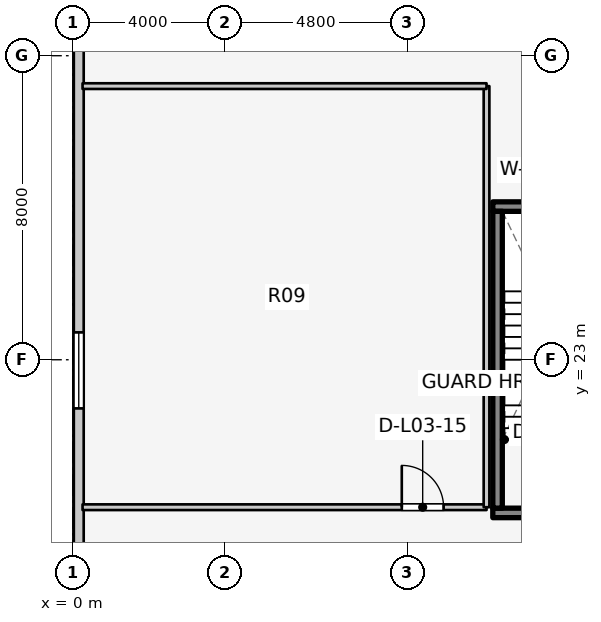
"""IFC4 building model, lengths in metres.
Left out: names, types, materials, properties, quantities, classifications, styles, units other than length and angle.
Written with IfcOpenShell. Run it as: python <this file> out.ifc"""

import sys

from ifc_helpers import new_model, si_unit, direction, frame, frame_2d, origin, place, context, subcontext, project, spatial, rectangle, extrude, element, fill, save


model = new_model("IFC4")
c1 = context("Model", 3, precision=1e-05, world=origin(), true_north=direction((0.0, 1.0)))
c2 = subcontext(c1, "Body", "Model", "MODEL_VIEW")
j1 = project(units=[si_unit("LENGTHUNIT", "METRE"), si_unit("PLANEANGLEUNIT", "RADIAN")], contexts=[c1])
p1 = place(None, origin())
s1 = spatial("IfcSite", under=j1, at=p1, CompositionType="ELEMENT")
p2 = place(p1, origin())
s2 = spatial("IfcBuilding", under=s1, at=p2, CompositionType="ELEMENT")
p3 = place(p2, frame((0.0, 0.0, 9.2)))
s3 = spatial("IfcBuildingStorey", under=s2, at=p3, CompositionType="ELEMENT", Elevation=9.2)
p4 = place(p3, frame((11.045, 18.97, 0.0), z_axis=(0.0, 0.0, 1.0), x_axis=(1.0, 0.0, 0.0)))
e1 = element("IfcWall", 1, at=p4, inside=s3, PredefinedType="SOLIDWALL", context=c2, shape_type="SweptSolid", body=[
    extrude(rectangle(XDim=3.782, YDim=0.25, at=frame_2d((1.891, 0.0))), origin(), (0.0, 0.0, 1.0), 4.6),
])
p5 = place(p4, frame((1.135, 0.0, 0.0)))
e2 = element("IfcOpeningElement", 2, at=p5, cuts=e1, PredefinedType="OPENING", context=c2, shape_type="SweptSolid", body=[
    extrude(rectangle(XDim=1.1, YDim=2.1, at=frame_2d((0.55, 1.05))), frame((0.0, 0.135, 0.0), z_axis=(0.0, -1.0, 0.0), x_axis=(1.0, 0.0, 0.0)), (0.0, 0.0, 1.0), 0.27),
])
p6 = place(p3, frame((11.045, 27.03, 0.0), z_axis=(0.0, 0.0, 1.0), x_axis=(1.0, 0.0, 0.0)))
e3 = element("IfcWall", 3, at=p6, inside=s3, PredefinedType="SOLIDWALL", context=c2, shape_type="SweptSolid", body=[
    extrude(rectangle(XDim=3.782, YDim=0.25, at=frame_2d((1.891, 0.0))), origin(), (0.0, 0.0, 1.0), 4.6),
])
p7 = place(p3, frame((11.17, 19.095, 0.0), z_axis=(0.0, 0.0, 1.0), x_axis=(0.0, 1.0, 0.0)))
e4 = element("IfcWall", 4, at=p7, inside=s3, PredefinedType="SOLIDWALL", context=c2, shape_type="SweptSolid", body=[
    extrude(rectangle(XDim=7.81, YDim=0.25, at=frame_2d((3.905, 0.0))), origin(), (0.0, 0.0, 1.0), 4.6),
])
p8 = place(p3, frame((0.15, 45.72, 0.0), z_axis=(0.0, 0.0, 1.0), x_axis=(0.0, -1.0, 0.0)))
e5 = element("IfcWall", 5, at=p8, inside=s3, PredefinedType="STANDARD", context=c2, shape_type="SweptSolid", body=[
    extrude(rectangle(XDim=45.44, YDim=0.26, at=frame_2d((22.72, 0.0))), origin(), (0.0, 0.0, 1.0), 4.28),
])
p9 = place(p8, frame((6.0, 0.0, 2.2)))
e6 = element("IfcOpeningElement", 6, at=p9, cuts=e5, PredefinedType="OPENING", context=c2, shape_type="SweptSolid", body=[
    extrude(rectangle(XDim=2.0, YDim=1.1, at=frame_2d((1.0, 0.55))), frame((0.0, 0.14, 0.0), z_axis=(0.0, -1.0, 0.0), x_axis=(1.0, 0.0, 0.0)), (0.0, 0.0, 1.0), 0.28),
])
p10 = place(p8, frame((22.0, 0.0, 2.2)))
e7 = element("IfcOpeningElement", 7, at=p10, cuts=e5, PredefinedType="OPENING", context=c2, shape_type="SweptSolid", body=[
    extrude(rectangle(XDim=2.0, YDim=1.1, at=frame_2d((1.0, 0.55))), frame((0.0, 0.14, 0.0), z_axis=(0.0, -1.0, 0.0), x_axis=(1.0, 0.0, 0.0)), (0.0, 0.0, 1.0), 0.28),
])
p11 = place(p8, frame((38.0, 0.0, 2.2)))
e8 = element("IfcOpeningElement", 8, at=p11, cuts=e5, PredefinedType="OPENING", context=c2, shape_type="SweptSolid", body=[
    extrude(rectangle(XDim=2.0, YDim=1.1, at=frame_2d((1.0, 0.55))), frame((0.0, 0.14, 0.0), z_axis=(0.0, -1.0, 0.0), x_axis=(1.0, 0.0, 0.0)), (0.0, 0.0, 1.0), 0.28),
])
p12 = place(p3, frame((0.25, 19.12, 0.0), z_axis=(0.0, 0.0, 1.0), x_axis=(1.0, 0.0, 0.0)))
e9 = element("IfcWall", 9, at=p12, inside=s3, PredefinedType="PARTITIONING", context=c2, shape_type="SweptSolid", body=[
    extrude(rectangle(XDim=10.63, YDim=0.15, at=frame_2d((5.315, 0.0))), origin(), (0.0, 0.0, 1.0), 3.3),
])
p13 = place(p12, frame((8.4, 0.0, 0.0)))
e10 = element("IfcOpeningElement", 10, at=p13, cuts=e9, PredefinedType="OPENING", context=c2, shape_type="SweptSolid", body=[
    extrude(rectangle(XDim=1.1, YDim=2.1, at=frame_2d((0.55, 1.05))), frame((0.0, 0.085, 0.0), z_axis=(0.0, -1.0, 0.0), x_axis=(1.0, 0.0, 0.0)), (0.0, 0.0, 1.0), 0.17),
])
p14 = place(p3, frame((10.88, 19.12, 0.0), z_axis=(0.0, 0.0, 1.0), x_axis=(0.0, 1.0, 0.0)))
e11 = element("IfcWall", 11, at=p14, inside=s3, PredefinedType="PARTITIONING", context=c2, shape_type="SweptSolid", body=[
    extrude(rectangle(XDim=11.08, YDim=0.15, at=frame_2d((5.54, 0.0))), origin(), (0.0, 0.0, 1.0), 3.62),
])
p15 = place(p3, frame((0.25, 30.2, 0.0), z_axis=(0.0, 0.0, 1.0), x_axis=(1.0, 0.0, 0.0)))
e12 = element("IfcWall", 12, at=p15, inside=s3, PredefinedType="PARTITIONING", context=c2, shape_type="SweptSolid", body=[
    extrude(rectangle(XDim=10.63, YDim=0.15, at=frame_2d((5.315, 0.0))), origin(), (0.0, 0.0, 1.0), 3.3),
])
p16 = place(p10, origin())
e13 = element("IfcWindow", 13, at=p16, inside=s3, PartitioningType="SINGLE_PANEL", PredefinedType="WINDOW", context=c2, shape_type="SweptSolid", body=[
    extrude(rectangle(XDim=2.0, YDim=1.1, at=frame_2d((1.0, 0.55))), frame((0.0, 0.03, 0.0), z_axis=(0.0, -1.0, 0.0), x_axis=(1.0, 0.0, 0.0)), (0.0, 0.0, 1.0), 0.06),
])
fill(e7, e13)
p17 = place(p13, origin())
e14 = element("IfcDoor", 14, at=p17, inside=s3, OperationType="SINGLE_SWING_LEFT", PredefinedType="DOOR", context=c2, shape_type="SweptSolid", body=[
    extrude(rectangle(XDim=1.1, YDim=2.1, at=frame_2d((0.55, 1.05))), frame((0.0, 0.025, 0.0), z_axis=(0.0, -1.0, 0.0), x_axis=(1.0, 0.0, 0.0)), (0.0, 0.0, 1.0), 0.05),
])
fill(e10, e14)
save(model, sys.argv[1])
